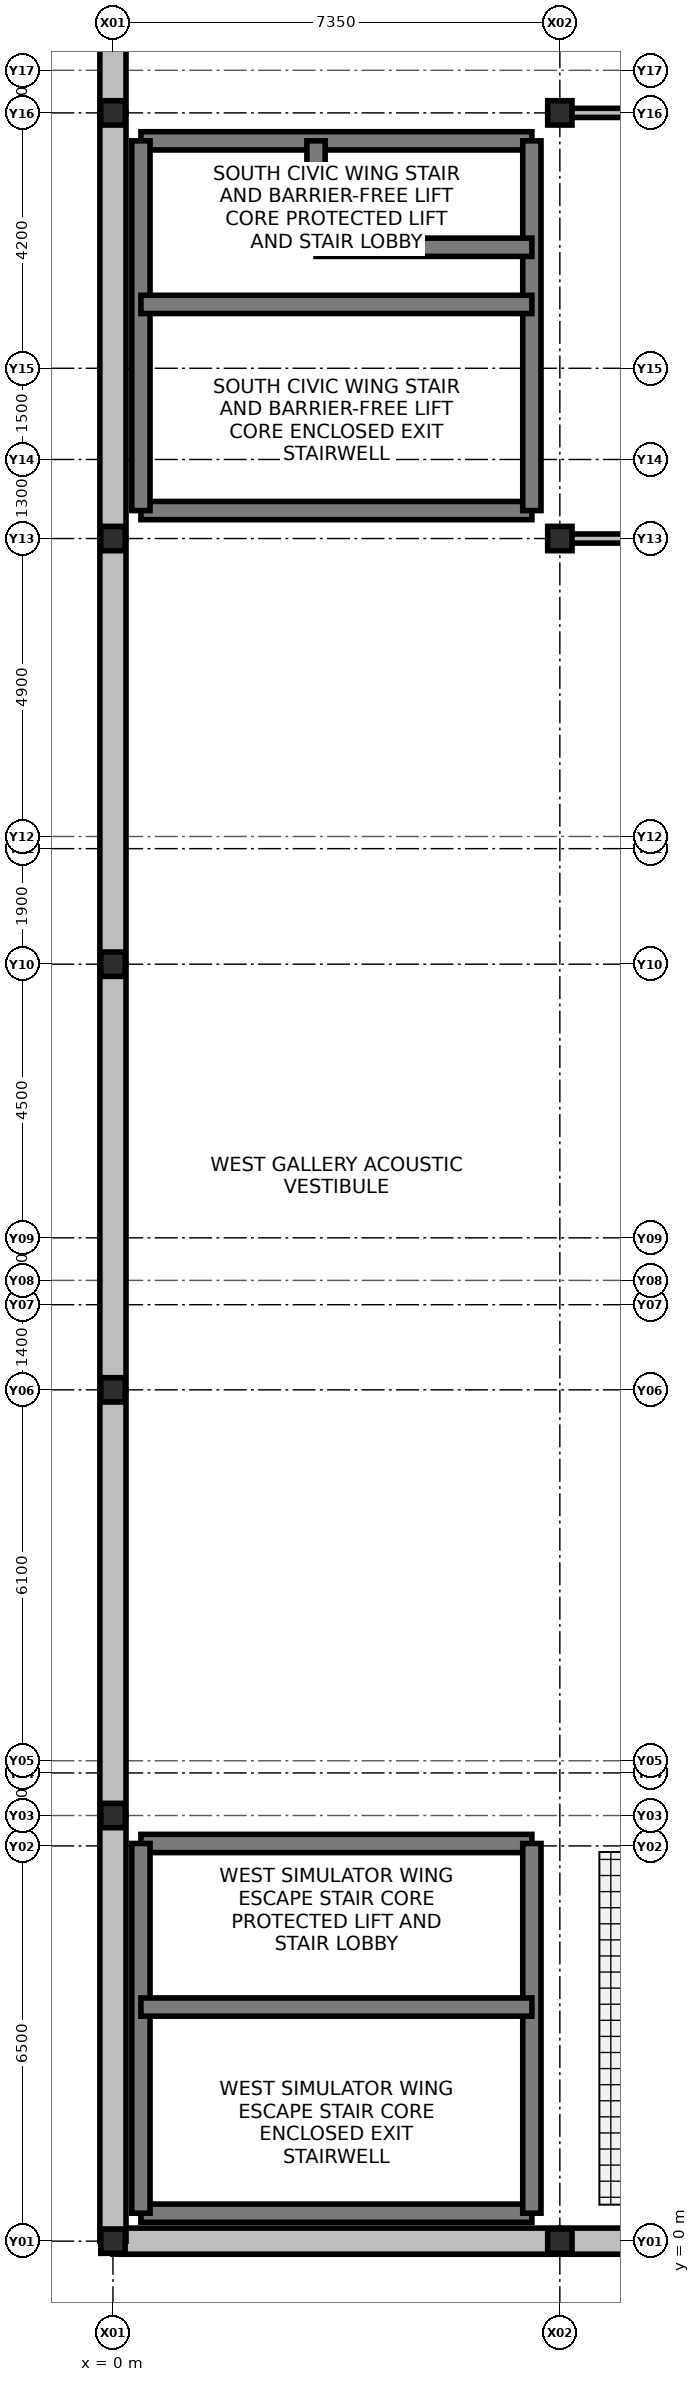
"""IFC4 building model, lengths in metres.
Left out: names, types, materials, properties, quantities, classifications, styles, units other than length and angle.
Written with IfcOpenShell. Run it as: python <this file> out.ifc"""

import sys

from ifc_helpers import new_model, si_unit, direction, frame, frame_2d, origin, origin_with_axes, origin_2d, place, context, subcontext, project, spatial, rectangle, i_section, extrude, element, fill, save


model = new_model("IFC4")
c1 = context("Model", 3, precision=1e-05, world=origin(), true_north=direction((0.0, 1.0)))
c2 = subcontext(c1, "Body", "Model", "MODEL_VIEW")
j1 = project(units=[si_unit("LENGTHUNIT", "METRE"), si_unit("PLANEANGLEUNIT", "RADIAN")], contexts=[c1])
p1 = place(None, origin())
s1 = spatial("IfcSite", under=j1, at=p1, CompositionType="ELEMENT")
p2 = place(p1, origin())
s2 = spatial("IfcBuilding", under=s1, at=p2, CompositionType="ELEMENT")
p3 = place(p2, origin())
s3 = spatial("IfcBuildingStorey", under=s2, at=p3, CompositionType="ELEMENT", Elevation=0.0)
for number, where, z_axis, x_axis in (
    (1, (0.0, 0.0, -0.35), (0.0, 0.0, 1.0), (1.0, 0.0, 0.0)),
    (2, (0.0, 7.0, -0.35), (0.0, 0.0, 1.0), (1.0, 0.0, 0.0)),
    (3, (0.0, 14.0, -0.35), (0.0, 0.0, 1.0), (1.0, 0.0, 0.0)),
    (4, (0.0, 21.0, -0.35), (0.0, 0.0, 1.0), (1.0, 0.0, 0.0)),
    (5, (0.0, 28.0, -0.35), (0.0, 0.0, 1.0), (1.0, 0.0, 0.0)),
    (6, (0.0, 35.0, -0.35), (0.0, 0.0, 1.0), (1.0, 0.0, 0.0)),
    (7, (7.35, 0.0, -0.35), (0.0, 0.0, 1.0), (1.0, 0.0, 0.0)),
    (8, (7.35, 28.0, -0.35), (0.0, 0.0, 1.0), (1.0, 0.0, 0.0)),
    (9, (7.35, 35.0, -0.35), (0.0, 0.0, 1.0), (1.0, 0.0, 0.0)),
):
    element("IfcColumn", number, at=place(p3, frame(where, z_axis=z_axis, x_axis=x_axis)), inside=s3, PredefinedType="COLUMN", context=c2, shape_type="SweptSolid", body=[
        extrude(i_section(OverallWidth=0.4, OverallDepth=0.4, WebThickness=0.013, FlangeThickness=0.021, at=origin_2d()), origin(), (0.0, 0.0, 1.0), 6.35),
    ])
p4 = place(p3, origin_with_axes())
e10 = element("IfcWall", 10, at=p4, inside=s3, PredefinedType="SOLIDWALL", context=c2, shape_type="SweptSolid", body=[
    extrude(rectangle(XDim=7.35, YDim=0.43, at=frame_2d((3.675, 0.0))), origin(), (0.0, 0.0, 1.0), 5.15),
])
p5 = place(p3, frame((7.35, 0.0, 0.0), z_axis=(0.0, 0.0, 1.0), x_axis=(1.0, 0.0, 0.0)))
e11 = element("IfcWall", 11, at=p5, inside=s3, PredefinedType="SOLIDWALL", context=c2, shape_type="SweptSolid", body=[
    extrude(rectangle(XDim=7.35, YDim=0.43, at=frame_2d((3.675, 0.0))), origin(), (0.0, 0.0, 1.0), 5.15),
])
p6 = place(p5, frame((2.75, 0.0, 0.0)))
e12 = element("IfcOpeningElement", 12, at=p6, cuts=e11, PredefinedType="OPENING", context=c2, shape_type="SweptSolid", body=[
    extrude(rectangle(XDim=1.8, YDim=2.4, at=frame_2d((0.9, 1.2))), frame((0.0, 0.225, 0.0), z_axis=(0.0, -1.0, 0.0), x_axis=(1.0, 0.0, 0.0)), (0.0, 0.0, 1.0), 0.45),
])
p7 = place(p3, frame((0.0, 0.0, 0.0), z_axis=(0.0, 0.0, 1.0), x_axis=(0.0, 1.0, 0.0)))
e13 = element("IfcWall", 13, at=p7, inside=s3, PredefinedType="SOLIDWALL", context=c2, shape_type="SweptSolid", body=[
    extrude(rectangle(XDim=7.0, YDim=0.43, at=frame_2d((3.5, 0.0))), origin(), (0.0, 0.0, 1.0), 5.15),
])
p8 = place(p7, frame((2.2, 0.0, 1.0)))
e14 = element("IfcOpeningElement", 14, at=p8, cuts=e13, PredefinedType="OPENING", context=c2, shape_type="SweptSolid", body=[
    extrude(rectangle(XDim=1.95, YDim=1.8, at=frame_2d((0.975, 0.9))), frame((0.0, 0.225, 0.0), z_axis=(0.0, -1.0, 0.0), x_axis=(1.0, 0.0, 0.0)), (0.0, 0.0, 1.0), 0.45),
])
p9 = place(p3, frame((0.0, 7.0, 0.0), z_axis=(0.0, 0.0, 1.0), x_axis=(0.0, 1.0, 0.0)))
e15 = element("IfcWall", 15, at=p9, inside=s3, PredefinedType="SOLIDWALL", context=c2, shape_type="SweptSolid", body=[
    extrude(rectangle(XDim=7.0, YDim=0.43, at=frame_2d((3.5, 0.0))), origin(), (0.0, 0.0, 1.0), 5.15),
])
p10 = place(p9, frame((2.2, 0.0, 1.0)))
e16 = element("IfcOpeningElement", 16, at=p10, cuts=e15, PredefinedType="OPENING", context=c2, shape_type="SweptSolid", body=[
    extrude(rectangle(XDim=2.75, YDim=2.05, at=frame_2d((1.375, 1.025))), frame((0.0, 0.225, 0.0), z_axis=(0.0, -1.0, 0.0), x_axis=(1.0, 0.0, 0.0)), (0.0, 0.0, 1.0), 0.45),
])
p11 = place(p3, frame((0.0, 14.0, 0.0), z_axis=(0.0, 0.0, 1.0), x_axis=(0.0, 1.0, 0.0)))
e17 = element("IfcWall", 17, at=p11, inside=s3, PredefinedType="SOLIDWALL", context=c2, shape_type="SweptSolid", body=[
    extrude(rectangle(XDim=7.0, YDim=0.43, at=frame_2d((3.5, 0.0))), origin(), (0.0, 0.0, 1.0), 5.15),
])
p12 = place(p11, frame((2.6, 0.0, 0.0)))
e18 = element("IfcOpeningElement", 18, at=p12, cuts=e17, PredefinedType="OPENING", context=c2, shape_type="SweptSolid", body=[
    extrude(rectangle(XDim=1.8, YDim=2.4, at=frame_2d((0.9, 1.2))), frame((0.0, 0.225, 0.0), z_axis=(0.0, -1.0, 0.0), x_axis=(1.0, 0.0, 0.0)), (0.0, 0.0, 1.0), 0.45),
])
p13 = place(p3, frame((0.0, 21.0, 0.0), z_axis=(0.0, 0.0, 1.0), x_axis=(0.0, 1.0, 0.0)))
e19 = element("IfcWall", 19, at=p13, inside=s3, PredefinedType="SOLIDWALL", context=c2, shape_type="SweptSolid", body=[
    extrude(rectangle(XDim=7.0, YDim=0.43, at=frame_2d((3.5, 0.0))), origin(), (0.0, 0.0, 1.0), 5.15),
])
p14 = place(p13, frame((2.2, 0.0, 1.0)))
e20 = element("IfcOpeningElement", 20, at=p14, cuts=e19, PredefinedType="OPENING", context=c2, shape_type="SweptSolid", body=[
    extrude(rectangle(XDim=1.6, YDim=1.8, at=frame_2d((0.8, 0.9))), frame((0.0, 0.225, 0.0), z_axis=(0.0, -1.0, 0.0), x_axis=(1.0, 0.0, 0.0)), (0.0, 0.0, 1.0), 0.45),
])
p15 = place(p3, frame((0.0, 28.0, 0.0), z_axis=(0.0, 0.0, 1.0), x_axis=(0.0, 1.0, 0.0)))
e21 = element("IfcWall", 21, at=p15, inside=s3, PredefinedType="SOLIDWALL", context=c2, shape_type="SweptSolid", body=[
    extrude(rectangle(XDim=7.0, YDim=0.43, at=frame_2d((3.5, 0.0))), origin(), (0.0, 0.0, 1.0), 5.15),
])
p16 = place(p15, frame((2.2, 0.0, 1.0)))
e22 = element("IfcOpeningElement", 22, at=p16, cuts=e21, PredefinedType="OPENING", context=c2, shape_type="SweptSolid", body=[
    extrude(rectangle(XDim=2.4, YDim=1.8, at=frame_2d((1.2, 0.9))), frame((0.0, 0.225, 0.0), z_axis=(0.0, -1.0, 0.0), x_axis=(1.0, 0.0, 0.0)), (0.0, 0.0, 1.0), 0.45),
])
p17 = place(p3, frame((0.0, 35.0, 0.0), z_axis=(0.0, 0.0, 1.0), x_axis=(0.0, 1.0, 0.0)))
e23 = element("IfcWall", 23, at=p17, inside=s3, PredefinedType="SOLIDWALL", context=c2, shape_type="SweptSolid", body=[
    extrude(rectangle(XDim=7.0, YDim=0.43, at=frame_2d((3.5, 0.0))), origin(), (0.0, 0.0, 1.0), 5.15),
])
p18 = place(p17, frame((2.2, 0.0, 1.0)))
e24 = element("IfcOpeningElement", 24, at=p18, cuts=e23, PredefinedType="OPENING", context=c2, shape_type="SweptSolid", body=[
    extrude(rectangle(XDim=3.0, YDim=2.2, at=frame_2d((1.5, 1.1))), frame((0.0, 0.225, 0.0), z_axis=(0.0, -1.0, 0.0), x_axis=(1.0, 0.0, 0.0)), (0.0, 0.0, 1.0), 0.45),
])
p19 = place(p3, frame((0.46, 28.46, -0.35), z_axis=(0.0, 0.0, 1.0), x_axis=(1.0, 0.0, 0.0)))
e25 = element("IfcWall", 25, at=p19, inside=s3, PredefinedType="SHEAR", context=c2, shape_type="SweptSolid", body=[
    extrude(rectangle(XDim=6.43, YDim=0.3, at=frame_2d((3.215, 0.0))), origin(), (0.0, 0.0, 1.0), 6.07),
])
p20 = place(p3, frame((0.46, 34.54, -0.35), z_axis=(0.0, 0.0, 1.0), x_axis=(1.0, 0.0, 0.0)))
e26 = element("IfcWall", 26, at=p20, inside=s3, PredefinedType="SHEAR", context=c2, shape_type="SweptSolid", body=[
    extrude(rectangle(XDim=6.43, YDim=0.3, at=frame_2d((3.215, 0.0))), origin(), (0.0, 0.0, 1.0), 6.07),
])
p21 = place(p20, frame((0.55, 0.0, 0.35)))
e27 = element("IfcOpeningElement", 27, at=p21, cuts=e26, PredefinedType="OPENING", context=c2, shape_type="SweptSolid", body=[
    extrude(rectangle(XDim=1.5, YDim=2.2, at=frame_2d((0.75, 1.1))), frame((0.0, 0.16, 0.0), z_axis=(0.0, -1.0, 0.0), x_axis=(1.0, 0.0, 0.0)), (0.0, 0.0, 1.0), 0.32),
])
for number, where, z_axis, x_axis in (
    (28, (0.46, 28.46, -0.35), (0.0, 0.0, 1.0), (0.0, 1.0, 0.0)),
    (29, (6.89, 28.46, -0.35), (0.0, 0.0, 1.0), (0.0, 1.0, 0.0)),
):
    element("IfcWall", number, at=place(p3, frame(where, z_axis=z_axis, x_axis=x_axis)), inside=s3, PredefinedType="SHEAR", context=c2, shape_type="SweptSolid", body=[
        extrude(rectangle(XDim=6.08, YDim=0.3, at=frame_2d((3.04, 0.0))), origin(), (0.0, 0.0, 1.0), 6.07),
    ])
p22 = place(p3, frame((0.46, 31.85, -0.35), z_axis=(0.0, 0.0, 1.0), x_axis=(1.0, 0.0, 0.0)))
e30 = element("IfcWall", 30, at=p22, inside=s3, PredefinedType="SHEAR", context=c2, shape_type="SweptSolid", body=[
    extrude(rectangle(XDim=6.43, YDim=0.3, at=frame_2d((3.215, 0.0))), origin(), (0.0, 0.0, 1.0), 6.07),
])
p23 = place(p22, frame((0.185, 0.0, 0.35)))
e31 = element("IfcOpeningElement", 31, at=p23, cuts=e30, PredefinedType="OPENING", context=c2, shape_type="SweptSolid", body=[
    extrude(rectangle(XDim=1.05, YDim=2.15, at=frame_2d((0.525, 1.075))), frame((0.0, 0.16, 0.0), z_axis=(0.0, -1.0, 0.0), x_axis=(1.0, 0.0, 0.0)), (0.0, 0.0, 1.0), 0.32),
])
p24 = place(p3, frame((3.34, 32.79, -0.35), z_axis=(0.0, 0.0, 1.0), x_axis=(0.0, 1.0, 0.0)))
e32 = element("IfcWall", 32, at=p24, inside=s3, PredefinedType="SHEAR", context=c2, shape_type="SweptSolid", body=[
    extrude(rectangle(XDim=1.75, YDim=0.3, at=frame_2d((0.875, 0.0))), origin(), (0.0, 0.0, 1.0), 6.07),
])
p25 = place(p3, frame((3.34, 32.79, -0.35), z_axis=(0.0, 0.0, 1.0), x_axis=(1.0, 0.0, 0.0)))
e33 = element("IfcWall", 33, at=p25, inside=s3, PredefinedType="SHEAR", context=c2, shape_type="SweptSolid", body=[
    extrude(rectangle(XDim=3.55, YDim=0.3, at=frame_2d((1.775, 0.0))), origin(), (0.0, 0.0, 1.0), 6.07),
])
p26 = place(p25, frame((0.25, 0.0, 0.35)))
e34 = element("IfcOpeningElement", 34, at=p26, cuts=e33, PredefinedType="OPENING", context=c2, shape_type="SweptSolid", body=[
    extrude(rectangle(XDim=1.1, YDim=2.15, at=frame_2d((0.55, 1.075))), frame((0.0, 0.16, 0.0), z_axis=(0.0, -1.0, 0.0), x_axis=(1.0, 0.0, 0.0)), (0.0, 0.0, 1.0), 0.32),
])
p27 = place(p25, frame((1.75, 0.0, 0.35)))
e35 = element("IfcOpeningElement", 35, at=p27, cuts=e33, PredefinedType="OPENING", context=c2, shape_type="SweptSolid", body=[
    extrude(rectangle(XDim=1.2, YDim=2.2, at=frame_2d((0.6, 1.1))), frame((0.0, 0.16, 0.0), z_axis=(0.0, -1.0, 0.0), x_axis=(1.0, 0.0, 0.0)), (0.0, 0.0, 1.0), 0.32),
])
p28 = place(p3, frame((0.46, 0.46, -0.35), z_axis=(0.0, 0.0, 1.0), x_axis=(1.0, 0.0, 0.0)))
e36 = element("IfcWall", 36, at=p28, inside=s3, PredefinedType="SHEAR", context=c2, shape_type="SweptSolid", body=[
    extrude(rectangle(XDim=6.43, YDim=0.3, at=frame_2d((3.215, 0.0))), origin(), (0.0, 0.0, 1.0), 6.07),
])
p29 = place(p3, frame((0.46, 6.54, -0.35), z_axis=(0.0, 0.0, 1.0), x_axis=(1.0, 0.0, 0.0)))
e37 = element("IfcWall", 37, at=p29, inside=s3, PredefinedType="SHEAR", context=c2, shape_type="SweptSolid", body=[
    extrude(rectangle(XDim=6.43, YDim=0.3, at=frame_2d((3.215, 0.0))), origin(), (0.0, 0.0, 1.0), 6.07),
])
p30 = place(p29, frame((0.55, 0.0, 0.35)))
e38 = element("IfcOpeningElement", 38, at=p30, cuts=e37, PredefinedType="OPENING", context=c2, shape_type="SweptSolid", body=[
    extrude(rectangle(XDim=1.5, YDim=2.2, at=frame_2d((0.75, 1.1))), frame((0.0, 0.16, 0.0), z_axis=(0.0, -1.0, 0.0), x_axis=(1.0, 0.0, 0.0)), (0.0, 0.0, 1.0), 0.32),
])
for number, where, z_axis, x_axis in (
    (39, (0.46, 0.46, -0.35), (0.0, 0.0, 1.0), (0.0, 1.0, 0.0)),
    (40, (6.89, 0.46, -0.35), (0.0, 0.0, 1.0), (0.0, 1.0, 0.0)),
):
    element("IfcWall", number, at=place(p3, frame(where, z_axis=z_axis, x_axis=x_axis)), inside=s3, PredefinedType="SHEAR", context=c2, shape_type="SweptSolid", body=[
        extrude(rectangle(XDim=6.08, YDim=0.3, at=frame_2d((3.04, 0.0))), origin(), (0.0, 0.0, 1.0), 6.07),
    ])
p31 = place(p3, frame((0.46, 3.85, -0.35), z_axis=(0.0, 0.0, 1.0), x_axis=(1.0, 0.0, 0.0)))
e41 = element("IfcWall", 41, at=p31, inside=s3, PredefinedType="SHEAR", context=c2, shape_type="SweptSolid", body=[
    extrude(rectangle(XDim=6.43, YDim=0.3, at=frame_2d((3.215, 0.0))), origin(), (0.0, 0.0, 1.0), 6.07),
])
p32 = place(p31, frame((0.185, 0.0, 0.35)))
e42 = element("IfcOpeningElement", 42, at=p32, cuts=e41, PredefinedType="OPENING", context=c2, shape_type="SweptSolid", body=[
    extrude(rectangle(XDim=1.05, YDim=2.15, at=frame_2d((0.525, 1.075))), frame((0.0, 0.16, 0.0), z_axis=(0.0, -1.0, 0.0), x_axis=(1.0, 0.0, 0.0)), (0.0, 0.0, 1.0), 0.32),
])
p33 = place(p3, frame((7.35, 28.0, 0.0), z_axis=(0.0, 0.0, 1.0), x_axis=(1.0, 0.0, 0.0)))
e43 = element("IfcWall", 43, at=p33, inside=s3, PredefinedType="PARTITIONING", context=c2, shape_type="SweptSolid", body=[
    extrude(rectangle(XDim=22.05, YDim=0.15, at=frame_2d((11.025, 0.0))), origin(), (0.0, 0.0, 1.0), 4.35),
])
p34 = place(p33, frame((10.2, 0.0, 0.0)))
e44 = element("IfcOpeningElement", 44, at=p34, cuts=e43, PredefinedType="OPENING", context=c2, shape_type="SweptSolid", body=[
    extrude(rectangle(XDim=1.7, YDim=2.25, at=frame_2d((0.85, 1.125))), frame((0.0, 0.085, 0.0), z_axis=(0.0, -1.0, 0.0), x_axis=(1.0, 0.0, 0.0)), (0.0, 0.0, 1.0), 0.17),
])
p35 = place(p3, frame((7.35, 35.0, 0.0), z_axis=(0.0, 0.0, 1.0), x_axis=(1.0, 0.0, 0.0)))
e45 = element("IfcWall", 45, at=p35, inside=s3, PredefinedType="PARTITIONING", context=c2, shape_type="SweptSolid", body=[
    extrude(rectangle(XDim=14.7, YDim=0.15, at=frame_2d((7.35, 0.0))), origin(), (0.0, 0.0, 1.0), 4.35),
])
p36 = place(p35, frame((4.2, 0.0, 0.0)))
e46 = element("IfcOpeningElement", 46, at=p36, cuts=e45, PredefinedType="OPENING", context=c2, shape_type="SweptSolid", body=[
    extrude(rectangle(XDim=1.1, YDim=2.1, at=frame_2d((0.55, 1.05))), frame((0.0, 0.085, 0.0), z_axis=(0.0, -1.0, 0.0), x_axis=(1.0, 0.0, 0.0)), (0.0, 0.0, 1.0), 0.17),
])
p37 = place(p8, origin())
e47 = element("IfcWindow", 47, at=p37, inside=s3, PartitioningType="SINGLE_PANEL", PredefinedType="WINDOW", context=c2, shape_type="SweptSolid", body=[
    extrude(rectangle(XDim=1.95, YDim=1.8, at=frame_2d((0.975, 0.9))), frame((0.0, 0.03, 0.0), z_axis=(0.0, -1.0, 0.0), x_axis=(1.0, 0.0, 0.0)), (0.0, 0.0, 1.0), 0.06),
])
fill(e14, e47)
p38 = place(p10, origin())
e48 = element("IfcWindow", 48, at=p38, inside=s3, PartitioningType="SINGLE_PANEL", PredefinedType="WINDOW", context=c2, shape_type="SweptSolid", body=[
    extrude(rectangle(XDim=2.75, YDim=2.05, at=frame_2d((1.375, 1.025))), frame((0.0, 0.03, 0.0), z_axis=(0.0, -1.0, 0.0), x_axis=(1.0, 0.0, 0.0)), (0.0, 0.0, 1.0), 0.06),
])
fill(e16, e48)
p39 = place(p12, origin())
e49 = element("IfcDoor", 49, at=p39, inside=s3, OperationType="DOUBLE_DOOR_SINGLE_SWING", PredefinedType="DOOR", context=c2, shape_type="SweptSolid", body=[
    extrude(rectangle(XDim=1.8, YDim=2.4, at=frame_2d((0.9, 1.2))), frame((0.0, 0.025, 0.0), z_axis=(0.0, -1.0, 0.0), x_axis=(1.0, 0.0, 0.0)), (0.0, 0.0, 1.0), 0.05),
])
fill(e18, e49)
p40 = place(p14, origin())
e50 = element("IfcWindow", 50, at=p40, inside=s3, PartitioningType="SINGLE_PANEL", PredefinedType="WINDOW", context=c2, shape_type="SweptSolid", body=[
    extrude(rectangle(XDim=1.6, YDim=1.8, at=frame_2d((0.8, 0.9))), frame((0.0, 0.03, 0.0), z_axis=(0.0, -1.0, 0.0), x_axis=(1.0, 0.0, 0.0)), (0.0, 0.0, 1.0), 0.06),
])
fill(e20, e50)
p41 = place(p16, origin())
e51 = element("IfcWindow", 51, at=p41, inside=s3, PartitioningType="SINGLE_PANEL", PredefinedType="WINDOW", context=c2, shape_type="SweptSolid", body=[
    extrude(rectangle(XDim=2.4, YDim=1.8, at=frame_2d((1.2, 0.9))), frame((0.0, 0.03, 0.0), z_axis=(0.0, -1.0, 0.0), x_axis=(1.0, 0.0, 0.0)), (0.0, 0.0, 1.0), 0.06),
])
fill(e22, e51)
p42 = place(p23, origin())
e52 = element("IfcDoor", 52, at=p42, inside=s3, OperationType="SINGLE_SWING_RIGHT", PredefinedType="DOOR", context=c2, shape_type="SweptSolid", body=[
    extrude(rectangle(XDim=1.05, YDim=2.15, at=frame_2d((0.525, 1.075))), frame((0.0, 0.025, 0.0), z_axis=(0.0, -1.0, 0.0), x_axis=(1.0, 0.0, 0.0)), (0.0, 0.0, 1.0), 0.05),
])
fill(e31, e52)
p43 = place(p21, origin())
e53 = element("IfcDoor", 53, at=p43, inside=s3, OperationType="DOUBLE_DOOR_SINGLE_SWING", PredefinedType="DOOR", context=c2, shape_type="SweptSolid", body=[
    extrude(rectangle(XDim=1.5, YDim=2.2, at=frame_2d((0.75, 1.1))), frame((0.0, 0.025, 0.0), z_axis=(0.0, -1.0, 0.0), x_axis=(1.0, 0.0, 0.0)), (0.0, 0.0, 1.0), 0.05),
])
fill(e27, e53)
p44 = place(p26, origin())
e54 = element("IfcDoor", 54, at=p44, inside=s3, OperationType="SLIDING_TO_LEFT", PredefinedType="DOOR", context=c2, shape_type="SweptSolid", body=[
    extrude(rectangle(XDim=1.1, YDim=2.15, at=frame_2d((0.55, 1.075))), frame((0.0, 0.025, 0.0), z_axis=(0.0, -1.0, 0.0), x_axis=(1.0, 0.0, 0.0)), (0.0, 0.0, 1.0), 0.05),
])
fill(e34, e54)
p45 = place(p27, origin())
e55 = element("IfcDoor", 55, at=p45, inside=s3, OperationType="SLIDING_TO_RIGHT", PredefinedType="DOOR", context=c2, shape_type="SweptSolid", body=[
    extrude(rectangle(XDim=1.2, YDim=2.2, at=frame_2d((0.6, 1.1))), frame((0.0, 0.025, 0.0), z_axis=(0.0, -1.0, 0.0), x_axis=(1.0, 0.0, 0.0)), (0.0, 0.0, 1.0), 0.05),
])
fill(e35, e55)
p46 = place(p32, origin())
e56 = element("IfcDoor", 56, at=p46, inside=s3, OperationType="SINGLE_SWING_RIGHT", PredefinedType="DOOR", context=c2, shape_type="SweptSolid", body=[
    extrude(rectangle(XDim=1.05, YDim=2.15, at=frame_2d((0.525, 1.075))), frame((0.0, 0.025, 0.0), z_axis=(0.0, -1.0, 0.0), x_axis=(1.0, 0.0, 0.0)), (0.0, 0.0, 1.0), 0.05),
])
fill(e42, e56)
p47 = place(p30, origin())
e57 = element("IfcDoor", 57, at=p47, inside=s3, OperationType="DOUBLE_DOOR_SINGLE_SWING", PredefinedType="DOOR", context=c2, shape_type="SweptSolid", body=[
    extrude(rectangle(XDim=1.5, YDim=2.2, at=frame_2d((0.75, 1.1))), frame((0.0, 0.025, 0.0), z_axis=(0.0, -1.0, 0.0), x_axis=(1.0, 0.0, 0.0)), (0.0, 0.0, 1.0), 0.05),
])
fill(e38, e57)
save(model, sys.argv[1])
